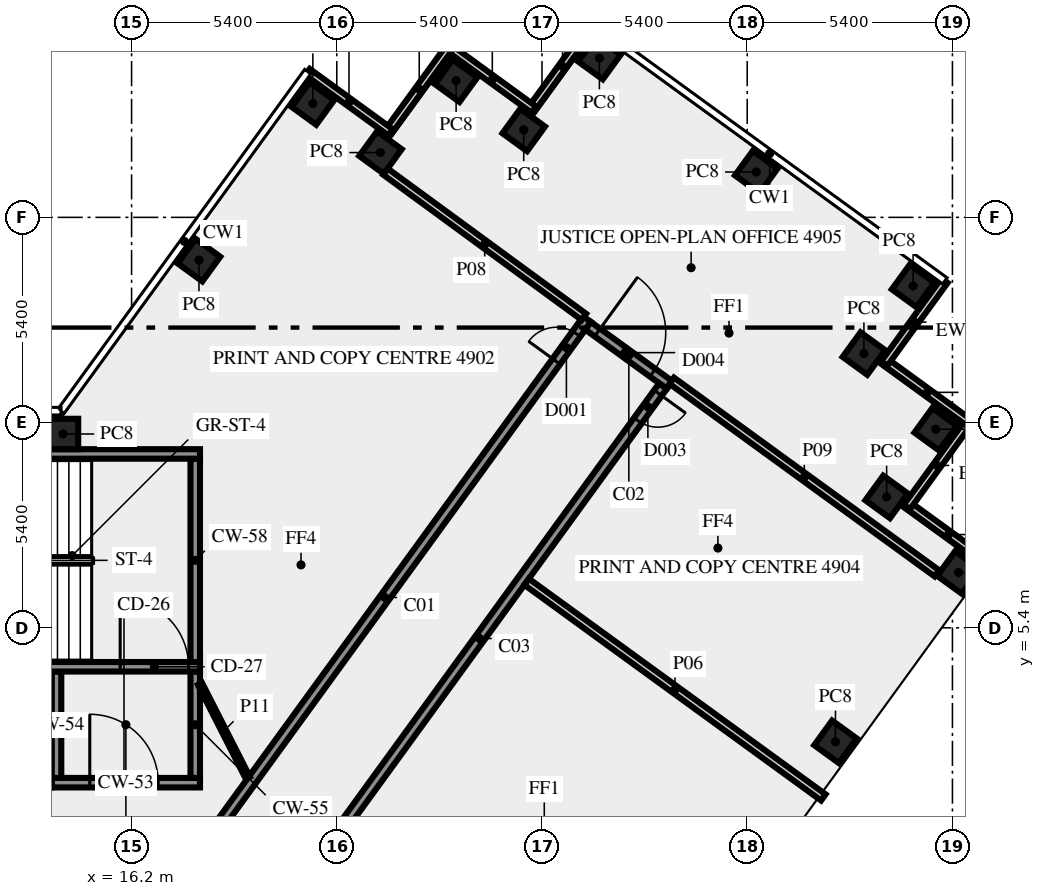
"""IFC4 building model, lengths in metres.
Left out: names, types, materials, properties, quantities, classifications, styles, units other than length and angle.
Written with IfcOpenShell. Run it as: python <this file> out.ifc"""

import sys

from ifc_helpers import new_model, si_unit, direction, frame, frame_2d, origin, origin_2d, place, context, subcontext, project, spatial, rectangle, extrude, element, fill, save


model = new_model("IFC4")
c1 = context("Model", 3, precision=1e-05, world=origin(), true_north=direction((0.0, 1.0)))
c2 = subcontext(c1, "Body", "Model", "MODEL_VIEW")
j1 = project(units=[si_unit("LENGTHUNIT", "METRE"), si_unit("PLANEANGLEUNIT", "RADIAN")], contexts=[c1])
p1 = place(None, origin())
s1 = spatial("IfcSite", under=j1, at=p1, CompositionType="ELEMENT")
p2 = place(p1, origin())
s2 = spatial("IfcBuilding", under=s1, at=p2, CompositionType="ELEMENT")
p3 = place(p2, frame((0.0, 0.0, 210.0)))
s3 = spatial("IfcBuildingStorey", under=s2, at=p3, CompositionType="ELEMENT", Elevation=210.0)
for number, where, z_axis, x_axis in (
    (1, (34.722, 2.4, 0.0), (0.0, 0.0, 1.0), (0.588, 0.809, 0.0)),
    (2, (37.96, 6.855, 0.0), (0.0, 0.0, 1.0), (0.588, 0.809, 0.0)),
    (3, (36.068, 8.844, 0.0), (0.0, 0.0, 1.0), (0.588, 0.809, 0.0)),
    (4, (37.36, 10.625, 0.0), (0.0, 0.0, 1.0), (0.588, 0.809, 0.0)),
    (5, (35.471, 12.616, 0.0), (0.0, 0.0, 1.0), (-0.809, 0.588, 0.0)),
    (6, (36.765, 14.395, 0.0), (0.0, 0.0, 1.0), (-0.809, 0.588, 0.0)),
    (7, (32.637, 17.393, 0.0), (0.0, 0.0, 1.0), (-0.809, 0.588, 0.0)),
    (8, (28.51, 20.39, 0.0), (0.0, 0.0, 1.0), (-0.588, -0.809, 0.0)),
    (9, (26.519, 18.5, 0.0), (0.0, 0.0, 1.0), (-0.809, 0.588, 0.0)),
    (10, (24.74, 19.795, 0.0), (0.0, 0.0, 1.0), (-0.588, -0.809, 0.0)),
    (11, (22.749, 17.904, 0.0), (0.0, 0.0, 1.0), (-0.588, -0.809, 0.0)),
    (12, (20.97, 19.195, 0.0), (0.0, 0.0, 1.0), (-0.588, -0.809, 0.0)),
    (13, (17.974, 15.075, 0.0), (0.0, 0.0, 1.0), (-0.588, -0.809, 0.0)),
    (14, (14.395, 10.5, 0.0), (0.0, 0.0, 1.0), (-1.0, 0.0, 0.0)),
):
    element("IfcColumn", number, at=place(p3, frame(where, z_axis=z_axis, x_axis=x_axis)), inside=s3, PredefinedType="COLUMN", context=c2, shape_type="SweptSolid", body=[
        extrude(rectangle(XDim=0.8, YDim=0.8, at=origin_2d()), origin(), (0.0, 0.0, 1.0), 3.65),
    ])
p4 = place(p3, frame((38.748, 7.09, 0.0), z_axis=(0.0, 0.0, 1.0), x_axis=(-0.80901210161, 0.587791986546, 0.0)))
e15 = element("IfcWall", 15, at=p4, inside=s3, PredefinedType="SOLIDWALL", context=c2, shape_type="SweptSolid", body=[
    extrude(rectangle(XDim=2.6, YDim=0.2, at=frame_2d((1.3, 0.0))), origin(), (0.0, 0.0, 1.0), 3.65),
])
for number, where, z_axis, x_axis in (
    (16, (36.602, 8.58, 0.0), (0.0, 0.0, 1.0), (0.588, 0.809, 0.0)),
    (17, (38.231, 10.802, 0.0), (0.0, 0.0, 1.0), (-0.809, 0.588, 0.0)),
    (18, (36.005, 12.352, 0.0), (0.0, 0.0, 1.0), (0.588, 0.809, 0.0)),
    (19, (28.334, 21.262, 0.0), (0.0, 0.0, 1.0), (-0.588, -0.809, 0.0)),
):
    element("IfcWall", number, at=place(p3, frame(where, z_axis=z_axis, x_axis=x_axis)), inside=s3, PredefinedType="SOLIDWALL", context=c2, shape_type="SweptSolid", body=[
        extrude(rectangle(XDim=2.7, YDim=0.2, at=frame_2d((1.35, 0.0))), origin(), (0.0, 0.0, 1.0), 3.65),
    ])
p5 = place(p3, frame((26.785, 19.036, 0.0), z_axis=(0.0, 0.0, 1.0), x_axis=(-0.809064397168, 0.587720002413, 0.0)))
e20 = element("IfcWall", 20, at=p5, inside=s3, PredefinedType="SOLIDWALL", context=c2, shape_type="SweptSolid", body=[
    extrude(rectangle(XDim=2.7, YDim=0.2, at=frame_2d((1.35, 0.0))), origin(), (0.0, 0.0, 1.0), 3.65),
])
for number, where, z_axis, x_axis in (
    (21, (24.563, 20.665, 0.0), (0.0, 0.0, 1.0), (-0.588, -0.809, 0.0)),
    (22, (23.013, 18.438, 0.0), (0.0, 0.0, 1.0), (-0.809, 0.588, 0.0)),
):
    element("IfcWall", number, at=place(p3, frame(where, z_axis=z_axis, x_axis=x_axis)), inside=s3, PredefinedType="SOLIDWALL", context=c2, shape_type="SweptSolid", body=[
        extrude(rectangle(XDim=2.7, YDim=0.2, at=frame_2d((1.35, 0.0))), origin(), (0.0, 0.0, 1.0), 3.65),
    ])
p6 = place(p3, frame((14.1, 1.325, 0.0), z_axis=(0.0, 0.0, 1.0), x_axis=(1.0, 0.0, 0.0)))
e23 = element("IfcWall", 23, at=p6, inside=s3, PredefinedType="SHEAR", context=c2, shape_type="SweptSolid", body=[
    extrude(rectangle(XDim=3.9, YDim=0.25, at=frame_2d((1.95, 0.0))), origin(), (0.0, 0.0, 1.0), 3.65),
])
p7 = place(p6, frame((1.0, 0.0, 0.0)))
e24 = element("IfcOpeningElement", 24, at=p7, cuts=e23, PredefinedType="OPENING", context=c2, shape_type="SweptSolid", body=[
    extrude(rectangle(XDim=1.8, YDim=2.1, at=frame_2d((0.9, 1.05))), frame((0.0, 0.135, 0.0), z_axis=(0.0, -1.0, 0.0), x_axis=(1.0, 0.0, 0.0)), (0.0, 0.0, 1.0), 0.27),
])
for number, where, z_axis, x_axis in (
    (25, (14.225, 1.45, 0.0), (0.0, 0.0, 1.0), (0.0, 1.0, 0.0)),
    (26, (17.875, 1.45, 0.0), (0.0, 0.0, 1.0), (0.0, 1.0, 0.0)),
):
    element("IfcWall", number, at=place(p3, frame(where, z_axis=z_axis, x_axis=x_axis)), inside=s3, PredefinedType="SHEAR", context=c2, shape_type="SweptSolid", body=[
        extrude(rectangle(XDim=2.8, YDim=0.25, at=frame_2d((1.4, 0.0))), origin(), (0.0, 0.0, 1.0), 3.65),
    ])
p8 = place(p3, frame((7.5, 4.375, 0.0), z_axis=(0.0, 0.0, 1.0), x_axis=(1.0, 0.0, 0.0)))
e27 = element("IfcWall", 27, at=p8, inside=s3, PredefinedType="SHEAR", context=c2, shape_type="SweptSolid", body=[
    extrude(rectangle(XDim=10.5, YDim=0.25, at=frame_2d((5.25, 0.0))), origin(), (0.0, 0.0, 1.0), 3.65),
])
p9 = place(p8, frame((8.4, 0.0, 0.0)))
e28 = element("IfcOpeningElement", 28, at=p9, cuts=e27, PredefinedType="OPENING", context=c2, shape_type="SweptSolid", body=[
    extrude(rectangle(XDim=1.8, YDim=2.1, at=frame_2d((0.9, 1.05))), frame((0.0, 0.135, 0.0), z_axis=(0.0, -1.0, 0.0), x_axis=(1.0, 0.0, 0.0)), (0.0, 0.0, 1.0), 0.27),
])
p10 = place(p3, frame((17.875, 4.5, 0.0), z_axis=(0.0, 0.0, 1.0), x_axis=(0.0, 1.0, 0.0)))
e29 = element("IfcWall", 29, at=p10, inside=s3, PredefinedType="SHEAR", context=c2, shape_type="SweptSolid", body=[
    extrude(rectangle(XDim=5.35, YDim=0.25, at=frame_2d((2.675, 0.0))), origin(), (0.0, 0.0, 1.0), 3.65),
])
p11 = place(p3, frame((7.5, 9.975, 0.0), z_axis=(0.0, 0.0, 1.0), x_axis=(1.0, 0.0, 0.0)))
e30 = element("IfcWall", 30, at=p11, inside=s3, PredefinedType="SHEAR", context=c2, shape_type="SweptSolid", body=[
    extrude(rectangle(XDim=10.5, YDim=0.25, at=frame_2d((5.25, 0.0))), origin(), (0.0, 0.0, 1.0), 3.65),
])
p12 = place(p11, frame((2.0, 0.0, 1.0)))
e31 = element("IfcOpeningElement", 31, at=p12, cuts=e30, PredefinedType="OPENING", context=c2, shape_type="SweptSolid", body=[
    extrude(rectangle(XDim=1.2, YDim=1.2, at=frame_2d((0.6, 0.6))), frame((0.0, 0.135, 0.0), z_axis=(0.0, -1.0, 0.0), x_axis=(1.0, 0.0, 0.0)), (0.0, 0.0, 1.0), 0.27),
])
p13 = place(p3, frame((17.545, -1.125, 0.0), z_axis=(0.0, 0.0, 1.0), x_axis=(0.58779555165, 0.809009511354, 0.0)))
e32 = element("IfcWall", 32, at=p13, inside=s3, PredefinedType="SOLIDWALL", context=c2, shape_type="SweptSolid", body=[
    extrude(rectangle(XDim=18.103, YDim=0.25, at=frame_2d((9.052, 0.0))), origin(), (0.0, 0.0, 1.0), 3.65),
])
p14 = place(p13, frame((16.728, 0.0, 0.0)))
e33 = element("IfcOpeningElement", 33, at=p14, cuts=e32, PredefinedType="OPENING", context=c2, shape_type="SweptSolid", body=[
    extrude(rectangle(XDim=0.9, YDim=2.1, at=frame_2d((0.45, 1.05))), frame((0.0, 0.135, 0.0), z_axis=(0.0, -1.0, 0.0), x_axis=(1.0, 0.0, 0.0)), (0.0, 0.0, 1.0), 0.27),
])
p15 = place(p3, frame((28.213, 13.346, 0.0), z_axis=(0.0, 0.0, 1.0), x_axis=(0.809006914995, -0.587799125119, 0.0)))
e34 = element("IfcWall", 34, at=p15, inside=s3, PredefinedType="SOLIDWALL", context=c2, shape_type="SweptSolid", body=[
    extrude(rectangle(XDim=2.65, YDim=0.25, at=frame_2d((1.325, 0.0))), origin(), (0.0, 0.0, 1.0), 3.65),
])
p16 = place(p15, frame((0.3, 0.0, 0.0)))
e35 = element("IfcOpeningElement", 35, at=p16, cuts=e34, PredefinedType="OPENING", context=c2, shape_type="SweptSolid", body=[
    extrude(rectangle(XDim=1.8, YDim=2.1, at=frame_2d((0.9, 1.05))), frame((0.0, 0.135, 0.0), z_axis=(0.0, -1.0, 0.0), x_axis=(1.0, 0.0, 0.0)), (0.0, 0.0, 1.0), 0.27),
])
p17 = place(p3, frame((30.183, 11.761, 0.0), z_axis=(0.0, 0.0, 1.0), x_axis=(-0.587781762867, -0.80901952958, 0.0)))
e36 = element("IfcWall", 36, at=p17, inside=s3, PredefinedType="SOLIDWALL", context=c2, shape_type="SweptSolid", body=[
    extrude(rectangle(XDim=16.42, YDim=0.25, at=frame_2d((8.21, 0.0))), origin(), (0.0, 0.0, 1.0), 3.65),
])
p18 = place(p17, frame((14.988, 0.0, 0.0)))
e37 = element("IfcOpeningElement", 37, at=p18, cuts=e36, PredefinedType="OPENING", context=c2, shape_type="SweptSolid", body=[
    extrude(rectangle(XDim=0.9, YDim=2.1, at=frame_2d((0.45, 1.05))), frame((0.0, 0.135, 0.0), z_axis=(0.0, -1.0, 0.0), x_axis=(1.0, 0.0, 0.0)), (0.0, 0.0, 1.0), 0.27),
])
p19 = place(p17, frame((0.225, 0.0, 0.0)))
e38 = element("IfcOpeningElement", 38, at=p19, cuts=e36, PredefinedType="OPENING", context=c2, shape_type="SweptSolid", body=[
    extrude(rectangle(XDim=0.9, YDim=2.1, at=frame_2d((0.45, 1.05))), frame((0.0, 0.135, 0.0), z_axis=(0.0, -1.0, 0.0), x_axis=(1.0, 0.0, 0.0)), (0.0, 0.0, 1.0), 0.27),
])
p20 = place(p3, frame((34.403, 0.938, 0.0), z_axis=(0.0, 0.0, 1.0), x_axis=(-0.808990890476, 0.587821179549, 0.0)))
e39 = element("IfcWall", 39, at=p20, inside=s3, PredefinedType="SOLIDWALL", context=c2, shape_type="SweptSolid", body=[
    extrude(rectangle(XDim=9.651, YDim=0.2, at=frame_2d((4.826, 0.0))), origin(), (0.0, 0.0, 1.0), 2.85),
])
p21 = place(p3, frame((22.884, 17.401, 0.0), z_axis=(0.0, 0.0, 1.0), x_axis=(0.80698686941, -0.590569380005, 0.0)))
e40 = element("IfcWall", 40, at=p21, inside=s3, PredefinedType="SOLIDWALL", context=c2, shape_type="SweptSolid", body=[
    extrude(rectangle(XDim=6.465, YDim=0.2, at=frame_2d((3.232, 0.0))), origin(), (0.0, 0.0, 1.0), 3.65),
])
p22 = place(p3, frame((30.415, 11.902, 0.0), z_axis=(0.0, 0.0, 1.0), x_axis=(0.809012783133, -0.587791048526, 0.0)))
e41 = element("IfcWall", 41, at=p22, inside=s3, PredefinedType="SOLIDWALL", context=c2, shape_type="SweptSolid", body=[
    extrude(rectangle(XDim=8.62, YDim=0.2, at=frame_2d((4.31, 0.0))), origin(), (0.0, 0.0, 1.0), 3.65),
])
p23 = place(p3, frame((18.0, 3.925, 0.0), z_axis=(0.0, 0.0, 1.0), x_axis=(0.453950796792, -0.891026752736, 0.0)))
e42 = element("IfcWall", 42, at=p23, inside=s3, PredefinedType="PARTITIONING", context=c2, shape_type="SweptSolid", body=[
    extrude(rectangle(XDim=2.778, YDim=0.12, at=frame_2d((1.389, 0.0))), origin(), (0.0, 0.0, 1.0), 3.65),
])
p24 = place(p7, origin())
e43 = element("IfcDoor", 43, at=p24, inside=s3, OperationType="DOUBLE_DOOR_SINGLE_SWING", PredefinedType="DOOR", context=c2, shape_type="SweptSolid", body=[
    extrude(rectangle(XDim=1.8, YDim=2.1, at=frame_2d((0.9, 1.05))), frame((0.0, 0.025, 0.0), z_axis=(0.0, -1.0, 0.0), x_axis=(1.0, 0.0, 0.0)), (0.0, 0.0, 1.0), 0.05),
])
fill(e24, e43)
p25 = place(p9, origin())
e44 = element("IfcDoor", 44, at=p25, inside=s3, OperationType="DOUBLE_DOOR_SINGLE_SWING", PredefinedType="DOOR", context=c2, shape_type="SweptSolid", body=[
    extrude(rectangle(XDim=1.8, YDim=2.1, at=frame_2d((0.9, 1.05))), frame((0.0, 0.025, 0.0), z_axis=(0.0, -1.0, 0.0), x_axis=(1.0, 0.0, 0.0)), (0.0, 0.0, 1.0), 0.05),
])
fill(e28, e44)
p26 = place(p16, origin())
e45 = element("IfcDoor", 45, at=p26, inside=s3, OperationType="DOUBLE_DOOR_SINGLE_SWING", PredefinedType="DOOR", context=c2, shape_type="SweptSolid", body=[
    extrude(rectangle(XDim=1.8, YDim=2.1, at=frame_2d((0.9, 1.05))), frame((0.0, 0.025, 0.0), z_axis=(0.0, -1.0, 0.0), x_axis=(1.0, 0.0, 0.0)), (0.0, 0.0, 1.0), 0.05),
])
fill(e35, e45)
p27 = place(p14, origin())
e46 = element("IfcDoor", 46, at=p27, inside=s3, OperationType="SINGLE_SWING_RIGHT", PredefinedType="DOOR", context=c2, shape_type="SweptSolid", body=[
    extrude(rectangle(XDim=0.9, YDim=2.1, at=frame_2d((0.45, 1.05))), frame((0.0, 0.025, 0.0), z_axis=(0.0, -1.0, 0.0), x_axis=(1.0, 0.0, 0.0)), (0.0, 0.0, 1.0), 0.05),
])
fill(e33, e46)
p28 = place(p19, origin())
e47 = element("IfcDoor", 47, at=p28, inside=s3, OperationType="SINGLE_SWING_LEFT", PredefinedType="DOOR", context=c2, shape_type="SweptSolid", body=[
    extrude(rectangle(XDim=0.9, YDim=2.1, at=frame_2d((0.45, 1.05))), frame((0.0, 0.025, 0.0), z_axis=(0.0, -1.0, 0.0), x_axis=(1.0, 0.0, 0.0)), (0.0, 0.0, 1.0), 0.05),
])
fill(e38, e47)
save(model, sys.argv[1])
